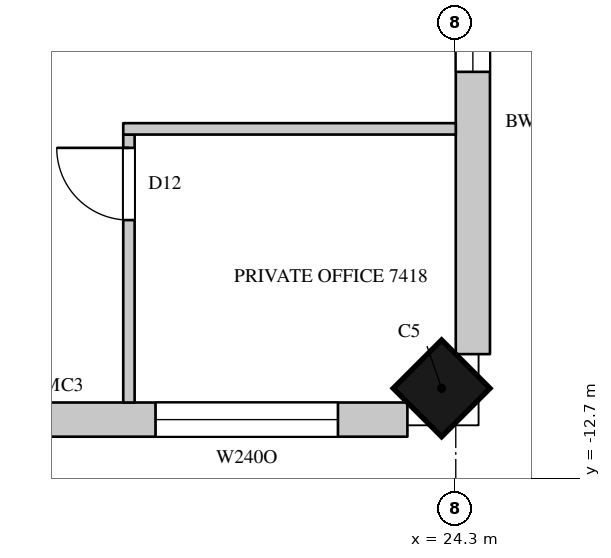
"""IFC4 building model, lengths in metres.
Left out: names, types, materials, properties, quantities, classifications, styles, units other than length and angle.
Written with IfcOpenShell. Run it as: python <this file> out.ifc"""

import sys

from ifc_helpers import new_model, si_unit, direction, frame, frame_2d, origin, origin_2d, place, context, subcontext, project, spatial, rectangle, extrude, element, fill, save


model = new_model("IFC4")
c1 = context("Model", 3, precision=1e-05, world=origin(), true_north=direction((0.0, 1.0)))
c2 = subcontext(c1, "Body", "Model", "MODEL_VIEW")
j1 = project(units=[si_unit("LENGTHUNIT", "METRE"), si_unit("PLANEANGLEUNIT", "RADIAN")], contexts=[c1])
p1 = place(None, origin())
s1 = spatial("IfcSite", under=j1, at=p1, CompositionType="ELEMENT")
p2 = place(p1, origin())
s2 = spatial("IfcBuilding", under=s1, at=p2, CompositionType="ELEMENT")
p3 = place(p2, frame((0.0, 0.0, 325.4)))
s3 = spatial("IfcBuildingStorey", under=s2, at=p3, CompositionType="ELEMENT", Elevation=325.4)
p4 = place(p3, frame((24.114, -11.514, 0.0), z_axis=(0.0, 0.0, 1.0), x_axis=(0.707106781187, 0.707106781187, 0.0)))
e1 = element("IfcColumn", 1, at=p4, inside=s3, PredefinedType="COLUMN", context=c2, shape_type="SweptSolid", body=[
    extrude(rectangle(XDim=0.9, YDim=0.9, at=origin_2d()), origin(), (0.0, 0.0, 1.0), 4.1),
])
p5 = place(p3, frame((18.648, -11.925, 0.0), z_axis=(0.0, 0.0, 1.0), x_axis=(1.0, 0.0, 0.0)))
e2 = element("IfcWall", 2, at=p5, inside=s3, PredefinedType="SOLIDWALL", context=c2, shape_type="SweptSolid", body=[
    extrude(rectangle(XDim=5.015, YDim=0.45, at=frame_2d((2.508, 0.0))), origin(), (0.0, 0.0, 1.0), 3.8),
])
p6 = place(p5, frame((1.702, 0.0, 1.05)))
e3 = element("IfcOpeningElement", 3, at=p6, cuts=e2, PredefinedType="OPENING", context=c2, shape_type="SweptSolid", body=[
    extrude(rectangle(XDim=2.4, YDim=2.4, at=frame_2d((1.2, 1.2))), frame((0.0, 0.235, 0.0), z_axis=(0.0, -1.0, 0.0), x_axis=(1.0, 0.0, 0.0)), (0.0, 0.0, 1.0), 0.47),
])
p7 = place(p3, frame((24.525, -11.064, 0.0), z_axis=(0.0, 0.0, 1.0), x_axis=(0.0, 1.0, 0.0)))
e4 = element("IfcWall", 4, at=p7, inside=s3, PredefinedType="SOLIDWALL", context=c2, shape_type="SweptSolid", body=[
    extrude(rectangle(XDim=6.114, YDim=0.45, at=frame_2d((3.057, 0.0))), origin(), (0.0, 0.0, 1.0), 3.8),
])
p8 = place(p7, frame((3.714, 0.0, 1.05)))
e5 = element("IfcOpeningElement", 5, at=p8, cuts=e4, PredefinedType="OPENING", context=c2, shape_type="SweptSolid", body=[
    extrude(rectangle(XDim=2.1, YDim=2.4, at=frame_2d((1.05, 1.2))), frame((0.0, 0.235, 0.0), z_axis=(0.0, -1.0, 0.0), x_axis=(1.0, 0.0, 0.0)), (0.0, 0.0, 1.0), 0.47),
])
p9 = place(p3, frame((20.0, -11.7, 0.0), z_axis=(0.0, 0.0, 1.0), x_axis=(0.0, 1.0, 0.0)))
e6 = element("IfcWall", 6, at=p9, inside=s3, PredefinedType="PARTITIONING", context=c2, shape_type="SweptSolid", body=[
    extrude(rectangle(XDim=3.525, YDim=0.15, at=frame_2d((1.762, 0.0))), origin(), (0.0, 0.0, 1.0), 3.8),
])
p10 = place(p9, frame((2.4, 0.0, 0.0)))
e7 = element("IfcOpeningElement", 7, at=p10, cuts=e6, PredefinedType="OPENING", context=c2, shape_type="SweptSolid", body=[
    extrude(rectangle(XDim=0.95, YDim=2.2, at=frame_2d((0.475, 1.1))), frame((0.0, 0.085, 0.0), z_axis=(0.0, -1.0, 0.0), x_axis=(1.0, 0.0, 0.0)), (0.0, 0.0, 1.0), 0.17),
])
p11 = place(p3, frame((19.925, -8.1, 0.0), z_axis=(0.0, 0.0, 1.0), x_axis=(1.0, 0.0, 0.0)))
e8 = element("IfcWall", 8, at=p11, inside=s3, PredefinedType="PARTITIONING", context=c2, shape_type="SweptSolid", body=[
    extrude(rectangle(XDim=4.375, YDim=0.15, at=frame_2d((2.188, 0.0))), origin(), (0.0, 0.0, 1.0), 3.8),
])
p12 = place(p8, origin())
e9 = element("IfcWindow", 9, at=p12, inside=s3, PartitioningType="SINGLE_PANEL", PredefinedType="WINDOW", context=c2, shape_type="SweptSolid", body=[
    extrude(rectangle(XDim=2.1, YDim=2.4, at=frame_2d((1.05, 1.2))), frame((0.0, 0.135, 0.0), z_axis=(0.0, -1.0, 0.0), x_axis=(1.0, 0.0, 0.0)), (0.0, 0.0, 1.0), 0.06),
])
fill(e5, e9)
p13 = place(p10, origin())
e10 = element("IfcDoor", 10, at=p13, inside=s3, OperationType="SINGLE_SWING_RIGHT", PredefinedType="DOOR", context=c2, shape_type="SweptSolid", body=[
    extrude(rectangle(XDim=0.95, YDim=2.2, at=frame_2d((0.475, 1.1))), frame((0.0, 0.025, 0.0), z_axis=(0.0, -1.0, 0.0), x_axis=(1.0, 0.0, 0.0)), (0.0, 0.0, 1.0), 0.05),
])
fill(e7, e10)
p14 = place(p6, origin())
e11 = element("IfcWindow", 11, at=p14, inside=s3, PartitioningType="SINGLE_PANEL", PredefinedType="WINDOW", context=c2, shape_type="SweptSolid", body=[
    extrude(rectangle(XDim=2.4, YDim=2.4, at=frame_2d((1.2, 1.2))), frame((0.0, 0.135, 0.0), z_axis=(0.0, -1.0, 0.0), x_axis=(1.0, 0.0, 0.0)), (0.0, 0.0, 1.0), 0.06),
])
fill(e3, e11)
save(model, sys.argv[1])
